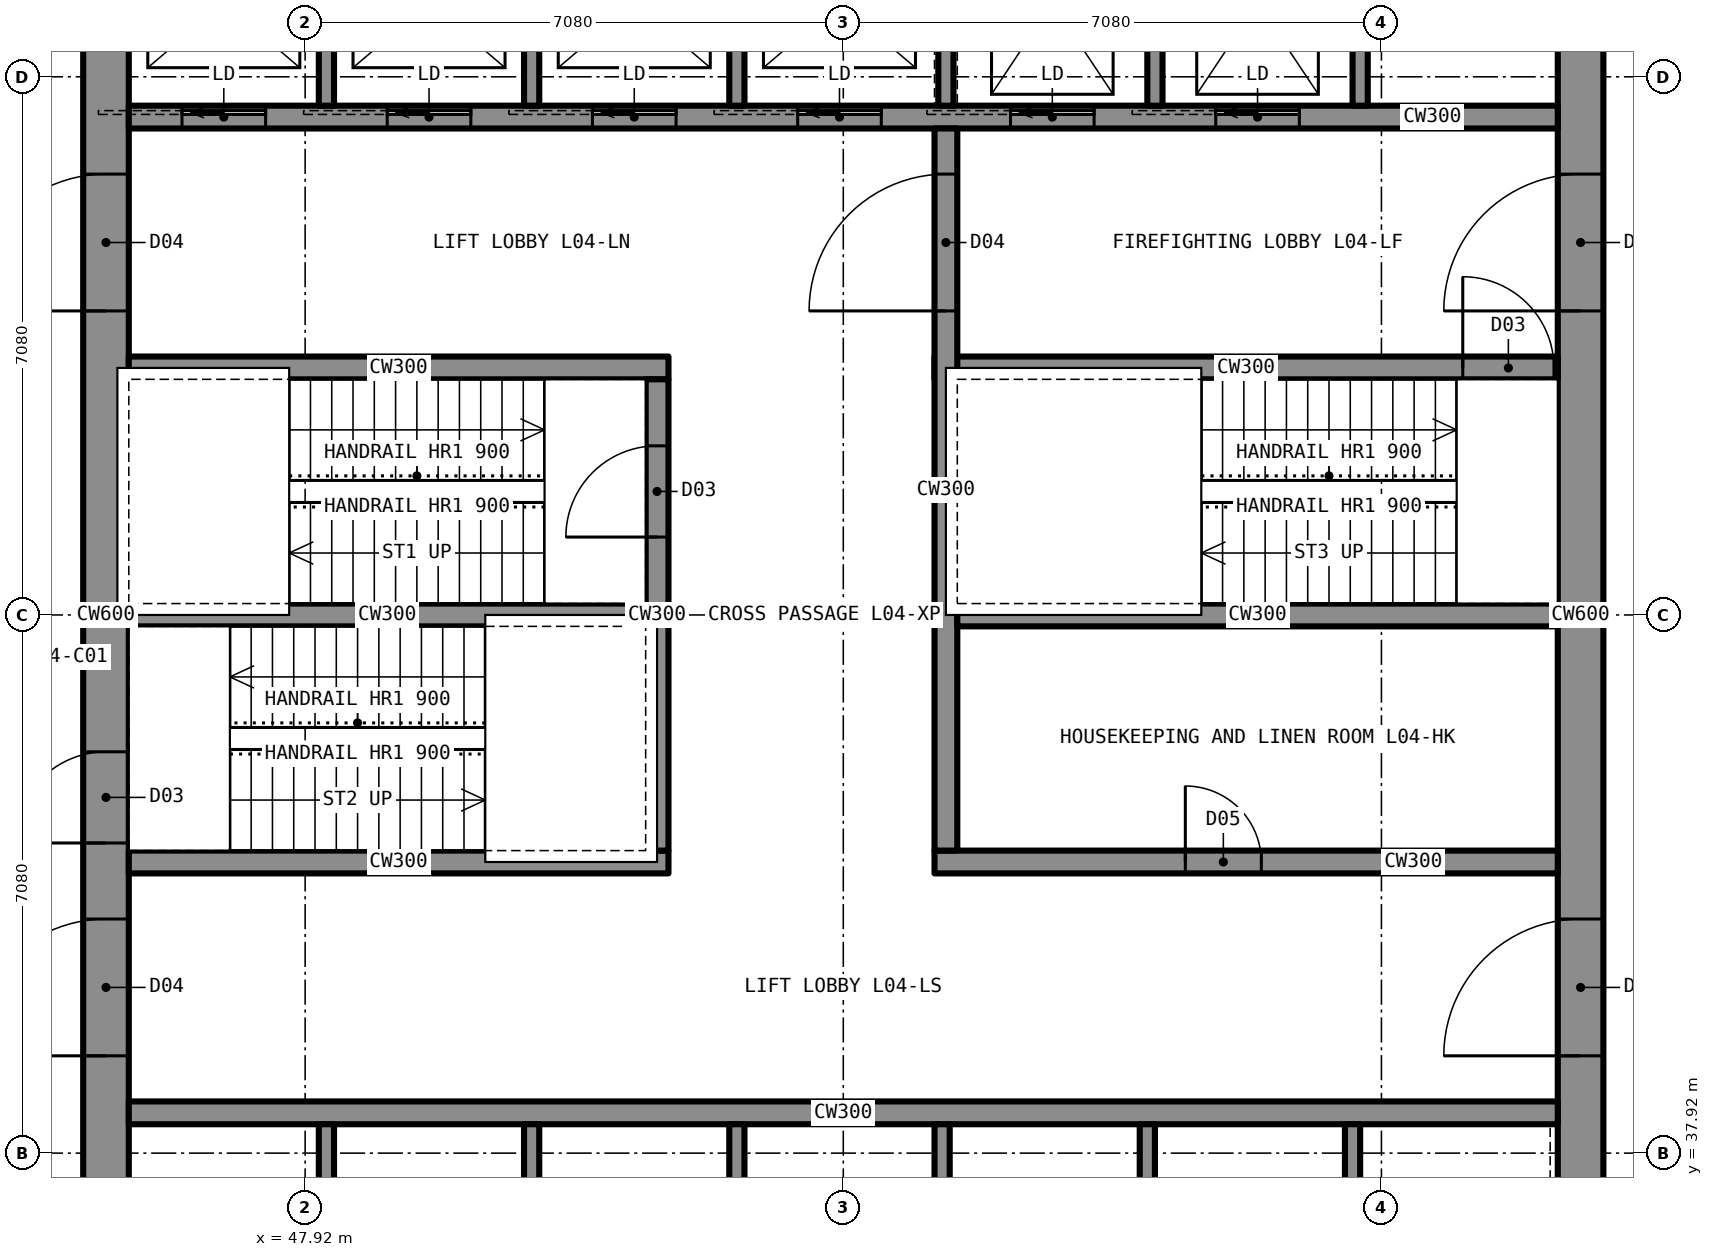
"""IFC4 building model, lengths in metres.
Left out: names, types, materials, properties, quantities, classifications, styles, units other than length and angle.
Written with IfcOpenShell. Run it as: python <this file> out.ifc"""

import sys

from ifc_helpers import new_model, si_unit, direction, frame, frame_2d, origin, place, context, subcontext, project, spatial, rectangle, extrude, element, fill, save


model = new_model("IFC4")
c1 = context("Model", 3, precision=1e-05, world=origin(), true_north=direction((0.0, 1.0)))
c2 = subcontext(c1, "Body", "Model", "MODEL_VIEW")
j1 = project(units=[si_unit("LENGTHUNIT", "METRE"), si_unit("PLANEANGLEUNIT", "RADIAN")], contexts=[c1])
p1 = place(None, origin())
s1 = spatial("IfcSite", under=j1, at=p1, CompositionType="ELEMENT")
p2 = place(p1, origin())
s2 = spatial("IfcBuilding", under=s1, at=p2, CompositionType="ELEMENT")
p3 = place(p2, frame((0.0, 0.0, 20.5)))
s3 = spatial("IfcBuildingStorey", under=s2, at=p3, CompositionType="ELEMENT", Elevation=20.5)
p4 = place(p3, frame((64.7, 35.6, 0.0), z_axis=(0.0, 0.0, 1.0), x_axis=(0.0, 1.0, 0.0)))
e1 = element("IfcWall", 1, at=p4, inside=s3, PredefinedType="SHEAR", context=c2, shape_type="SweptSolid", body=[
    extrude(rectangle(XDim=18.8, YDim=0.6, at=frame_2d((9.4, 0.0))), origin(), (0.0, 0.0, 1.0), 4.5),
])
p5 = place(p4, frame((13.4, 0.0, 0.0)))
e2 = element("IfcOpeningElement", 2, at=p5, cuts=e1, PredefinedType="OPENING", context=c2, shape_type="SweptSolid", body=[
    extrude(rectangle(XDim=1.8, YDim=2.2, at=frame_2d((0.9, 1.1))), frame((0.0, 0.31, 0.0), z_axis=(0.0, -1.0, 0.0), x_axis=(1.0, 0.0, 0.0)), (0.0, 0.0, 1.0), 0.62),
])
p6 = place(p4, frame((3.6, 0.0, 0.0)))
e3 = element("IfcOpeningElement", 3, at=p6, cuts=e1, PredefinedType="OPENING", context=c2, shape_type="SweptSolid", body=[
    extrude(rectangle(XDim=1.8, YDim=2.2, at=frame_2d((0.9, 1.1))), frame((0.0, 0.31, 0.0), z_axis=(0.0, -1.0, 0.0), x_axis=(1.0, 0.0, 0.0)), (0.0, 0.0, 1.0), 0.62),
])
p7 = place(p3, frame((45.3, 35.6, 0.0), z_axis=(0.0, 0.0, 1.0), x_axis=(0.0, 1.0, 0.0)))
e4 = element("IfcWall", 4, at=p7, inside=s3, PredefinedType="SHEAR", context=c2, shape_type="SweptSolid", body=[
    extrude(rectangle(XDim=18.8, YDim=0.6, at=frame_2d((9.4, 0.0))), origin(), (0.0, 0.0, 1.0), 4.5),
])
p8 = place(p7, frame((13.4, 0.0, 0.0)))
e5 = element("IfcOpeningElement", 5, at=p8, cuts=e4, PredefinedType="OPENING", context=c2, shape_type="SweptSolid", body=[
    extrude(rectangle(XDim=1.8, YDim=2.2, at=frame_2d((0.9, 1.1))), frame((0.0, 0.31, 0.0), z_axis=(0.0, -1.0, 0.0), x_axis=(1.0, 0.0, 0.0)), (0.0, 0.0, 1.0), 0.62),
])
p9 = place(p7, frame((3.6, 0.0, 0.0)))
e6 = element("IfcOpeningElement", 6, at=p9, cuts=e4, PredefinedType="OPENING", context=c2, shape_type="SweptSolid", body=[
    extrude(rectangle(XDim=1.8, YDim=2.2, at=frame_2d((0.9, 1.1))), frame((0.0, 0.31, 0.0), z_axis=(0.0, -1.0, 0.0), x_axis=(1.0, 0.0, 0.0)), (0.0, 0.0, 1.0), 0.62),
])
p10 = place(p7, frame((6.4, 0.0, 0.0)))
e7 = element("IfcOpeningElement", 7, at=p10, cuts=e4, PredefinedType="OPENING", context=c2, shape_type="SweptSolid", body=[
    extrude(rectangle(XDim=1.2, YDim=2.2, at=frame_2d((0.6, 1.1))), frame((0.0, 0.31, 0.0), z_axis=(0.0, -1.0, 0.0), x_axis=(1.0, 0.0, 0.0)), (0.0, 0.0, 1.0), 0.62),
])
p11 = place(p3, frame((45.6, 51.55, 0.0), z_axis=(0.0, 0.0, 1.0), x_axis=(1.0, 0.0, 0.0)))
e8 = element("IfcWall", 8, at=p11, inside=s3, PredefinedType="SHEAR", context=c2, shape_type="SweptSolid", body=[
    extrude(rectangle(XDim=18.8, YDim=0.3, at=frame_2d((9.4, 0.0))), origin(), (0.0, 0.0, 1.0), 4.5),
])
p12 = place(p11, frame((0.7, 0.0, 0.0)))
e9 = element("IfcOpeningElement", 9, at=p12, cuts=e8, PredefinedType="OPENING", context=c2, shape_type="SweptSolid", body=[
    extrude(rectangle(XDim=1.1, YDim=2.2, at=frame_2d((0.55, 1.1))), frame((0.0, 0.16, 0.0), z_axis=(0.0, -1.0, 0.0), x_axis=(1.0, 0.0, 0.0)), (0.0, 0.0, 1.0), 0.32),
])
p13 = place(p11, frame((3.4, 0.0, 0.0)))
e10 = element("IfcOpeningElement", 10, at=p13, cuts=e8, PredefinedType="OPENING", context=c2, shape_type="SweptSolid", body=[
    extrude(rectangle(XDim=1.1, YDim=2.2, at=frame_2d((0.55, 1.1))), frame((0.0, 0.16, 0.0), z_axis=(0.0, -1.0, 0.0), x_axis=(1.0, 0.0, 0.0)), (0.0, 0.0, 1.0), 0.32),
])
p14 = place(p11, frame((6.1, 0.0, 0.0)))
e11 = element("IfcOpeningElement", 11, at=p14, cuts=e8, PredefinedType="OPENING", context=c2, shape_type="SweptSolid", body=[
    extrude(rectangle(XDim=1.1, YDim=2.2, at=frame_2d((0.55, 1.1))), frame((0.0, 0.16, 0.0), z_axis=(0.0, -1.0, 0.0), x_axis=(1.0, 0.0, 0.0)), (0.0, 0.0, 1.0), 0.32),
])
p15 = place(p11, frame((8.8, 0.0, 0.0)))
e12 = element("IfcOpeningElement", 12, at=p15, cuts=e8, PredefinedType="OPENING", context=c2, shape_type="SweptSolid", body=[
    extrude(rectangle(XDim=1.1, YDim=2.2, at=frame_2d((0.55, 1.1))), frame((0.0, 0.16, 0.0), z_axis=(0.0, -1.0, 0.0), x_axis=(1.0, 0.0, 0.0)), (0.0, 0.0, 1.0), 0.32),
])
p16 = place(p11, frame((11.6, 0.0, 0.0)))
e13 = element("IfcOpeningElement", 13, at=p16, cuts=e8, PredefinedType="OPENING", context=c2, shape_type="SweptSolid", body=[
    extrude(rectangle(XDim=1.1, YDim=2.2, at=frame_2d((0.55, 1.1))), frame((0.0, 0.16, 0.0), z_axis=(0.0, -1.0, 0.0), x_axis=(1.0, 0.0, 0.0)), (0.0, 0.0, 1.0), 0.32),
])
p17 = place(p11, frame((14.3, 0.0, 0.0)))
e14 = element("IfcOpeningElement", 14, at=p17, cuts=e8, PredefinedType="OPENING", context=c2, shape_type="SweptSolid", body=[
    extrude(rectangle(XDim=1.1, YDim=2.2, at=frame_2d((0.55, 1.1))), frame((0.0, 0.16, 0.0), z_axis=(0.0, -1.0, 0.0), x_axis=(1.0, 0.0, 0.0)), (0.0, 0.0, 1.0), 0.32),
])
p18 = place(p3, frame((45.6, 38.45, 0.0), z_axis=(0.0, 0.0, 1.0), x_axis=(1.0, 0.0, 0.0)))
e15 = element("IfcWall", 15, at=p18, inside=s3, PredefinedType="SHEAR", context=c2, shape_type="SweptSolid", body=[
    extrude(rectangle(XDim=18.8, YDim=0.3, at=frame_2d((9.4, 0.0))), origin(), (0.0, 0.0, 1.0), 4.5),
])
p19 = place(p3, frame((45.6, 48.25, 0.0), z_axis=(0.0, 0.0, 1.0), x_axis=(1.0, 0.0, 0.0)))
e16 = element("IfcWall", 16, at=p19, inside=s3, PredefinedType="SHEAR", context=c2, shape_type="SweptSolid", body=[
    extrude(rectangle(XDim=7.1, YDim=0.3, at=frame_2d((3.55, 0.0))), origin(), (0.0, 0.0, 1.0), 4.5),
])
p20 = place(p3, frame((56.2, 48.25, 0.0), z_axis=(0.0, 0.0, 1.0), x_axis=(1.0, 0.0, 0.0)))
e17 = element("IfcWall", 17, at=p20, inside=s3, PredefinedType="SHEAR", context=c2, shape_type="SweptSolid", body=[
    extrude(rectangle(XDim=8.2, YDim=0.3, at=frame_2d((4.1, 0.0))), origin(), (0.0, 0.0, 1.0), 4.5),
])
p21 = place(p20, frame((6.95, 0.0, 0.0)))
e18 = element("IfcOpeningElement", 18, at=p21, cuts=e17, PredefinedType="OPENING", context=c2, shape_type="SweptSolid", body=[
    extrude(rectangle(XDim=1.2, YDim=2.2, at=frame_2d((0.6, 1.1))), frame((0.0, 0.16, 0.0), z_axis=(0.0, -1.0, 0.0), x_axis=(1.0, 0.0, 0.0)), (0.0, 0.0, 1.0), 0.32),
])
p22 = place(p3, frame((45.6, 41.75, 0.0), z_axis=(0.0, 0.0, 1.0), x_axis=(1.0, 0.0, 0.0)))
e19 = element("IfcWall", 19, at=p22, inside=s3, PredefinedType="SHEAR", context=c2, shape_type="SweptSolid", body=[
    extrude(rectangle(XDim=7.1, YDim=0.3, at=frame_2d((3.55, 0.0))), origin(), (0.0, 0.0, 1.0), 4.5),
])
p23 = place(p3, frame((56.2, 41.75, 0.0), z_axis=(0.0, 0.0, 1.0), x_axis=(1.0, 0.0, 0.0)))
e20 = element("IfcWall", 20, at=p23, inside=s3, PredefinedType="SHEAR", context=c2, shape_type="SweptSolid", body=[
    extrude(rectangle(XDim=8.2, YDim=0.3, at=frame_2d((4.1, 0.0))), origin(), (0.0, 0.0, 1.0), 4.5),
])
p24 = place(p23, frame((3.3, 0.0, 0.0)))
e21 = element("IfcOpeningElement", 21, at=p24, cuts=e20, PredefinedType="OPENING", context=c2, shape_type="SweptSolid", body=[
    extrude(rectangle(XDim=1.0, YDim=2.1, at=frame_2d((0.5, 1.05))), frame((0.0, 0.16, 0.0), z_axis=(0.0, -1.0, 0.0), x_axis=(1.0, 0.0, 0.0)), (0.0, 0.0, 1.0), 0.32),
])
p25 = place(p3, frame((52.55, 41.9, 0.0), z_axis=(0.0, 0.0, 1.0), x_axis=(0.0, 1.0, 0.0)))
e22 = element("IfcWall", 22, at=p25, inside=s3, PredefinedType="SHEAR", context=c2, shape_type="SweptSolid", body=[
    extrude(rectangle(XDim=6.2, YDim=0.3, at=frame_2d((3.1, 0.0))), origin(), (0.0, 0.0, 1.0), 4.5),
])
p26 = place(p25, frame((4.125, 0.0, 0.0)))
e23 = element("IfcOpeningElement", 23, at=p26, cuts=e22, PredefinedType="OPENING", context=c2, shape_type="SweptSolid", body=[
    extrude(rectangle(XDim=1.2, YDim=2.2, at=frame_2d((0.6, 1.1))), frame((0.0, 0.16, 0.0), z_axis=(0.0, -1.0, 0.0), x_axis=(1.0, 0.0, 0.0)), (0.0, 0.0, 1.0), 0.32),
])
p27 = place(p3, frame((56.35, 41.9, 0.0), z_axis=(0.0, 0.0, 1.0), x_axis=(0.0, 1.0, 0.0)))
e24 = element("IfcWall", 24, at=p27, inside=s3, PredefinedType="SHEAR", context=c2, shape_type="SweptSolid", body=[
    extrude(rectangle(XDim=9.5, YDim=0.3, at=frame_2d((4.75, 0.0))), origin(), (0.0, 0.0, 1.0), 4.5),
])
p28 = place(p27, frame((7.1, 0.0, 0.0)))
e25 = element("IfcOpeningElement", 25, at=p28, cuts=e24, PredefinedType="OPENING", context=c2, shape_type="SweptSolid", body=[
    extrude(rectangle(XDim=1.8, YDim=2.2, at=frame_2d((0.9, 1.1))), frame((0.0, 0.16, 0.0), z_axis=(0.0, -1.0, 0.0), x_axis=(1.0, 0.0, 0.0)), (0.0, 0.0, 1.0), 0.32),
])
p29 = place(p3, frame((45.6, 45.0, 0.0), z_axis=(0.0, 0.0, 1.0), x_axis=(1.0, 0.0, 0.0)))
e26 = element("IfcWall", 26, at=p29, inside=s3, PredefinedType="SHEAR", context=c2, shape_type="SweptSolid", body=[
    extrude(rectangle(XDim=6.8, YDim=0.3, at=frame_2d((3.4, 0.0))), origin(), (0.0, 0.0, 1.0), 4.5),
])
p30 = place(p3, frame((56.5, 45.0, 0.0), z_axis=(0.0, 0.0, 1.0), x_axis=(1.0, 0.0, 0.0)))
e27 = element("IfcWall", 27, at=p30, inside=s3, PredefinedType="SHEAR", context=c2, shape_type="SweptSolid", body=[
    extrude(rectangle(XDim=7.9, YDim=0.3, at=frame_2d((3.95, 0.0))), origin(), (0.0, 0.0, 1.0), 4.5),
])
for number, where, z_axis, x_axis in (
    (28, (48.2, 51.7, 0.0), (0.0, 0.0, 1.0), (0.0, 1.0, 0.0)),
    (29, (50.9, 51.7, 0.0), (0.0, 0.0, 1.0), (0.0, 1.0, 0.0)),
    (30, (53.6, 51.7, 0.0), (0.0, 0.0, 1.0), (0.0, 1.0, 0.0)),
    (31, (59.1, 51.7, 0.0), (0.0, 0.0, 1.0), (0.0, 1.0, 0.0)),
    (32, (61.8, 51.7, 0.0), (0.0, 0.0, 1.0), (0.0, 1.0, 0.0)),
    (33, (56.35, 51.7, 0.0), (0.0, 0.0, 1.0), (0.0, 1.0, 0.0)),
    (34, (48.2, 35.6, 0.0), (0.0, 0.0, 1.0), (0.0, 1.0, 0.0)),
    (35, (50.9, 35.6, 0.0), (0.0, 0.0, 1.0), (0.0, 1.0, 0.0)),
    (36, (53.6, 35.6, 0.0), (0.0, 0.0, 1.0), (0.0, 1.0, 0.0)),
    (37, (56.3, 35.6, 0.0), (0.0, 0.0, 1.0), (0.0, 1.0, 0.0)),
    (38, (59.0, 35.6, 0.0), (0.0, 0.0, 1.0), (0.0, 1.0, 0.0)),
    (39, (61.7, 35.6, 0.0), (0.0, 0.0, 1.0), (0.0, 1.0, 0.0)),
):
    element("IfcWall", number, at=place(p3, frame(where, z_axis=z_axis, x_axis=x_axis)), inside=s3, PredefinedType="PARTITIONING", context=c2, shape_type="SweptSolid", body=[
        extrude(rectangle(XDim=2.7, YDim=0.2, at=frame_2d((1.35, 0.0))), origin(), (0.0, 0.0, 1.0), 4.33),
    ])
p31 = place(p8, origin())
e40 = element("IfcDoor", 40, at=p31, inside=s3, OperationType="DOUBLE_DOOR_SINGLE_SWING", PredefinedType="DOOR", context=c2, shape_type="SweptSolid", body=[
    extrude(rectangle(XDim=1.8, YDim=2.2, at=frame_2d((0.9, 1.1))), frame((0.0, 0.025, 0.0), z_axis=(0.0, -1.0, 0.0), x_axis=(1.0, 0.0, 0.0)), (0.0, 0.0, 1.0), 0.05),
])
fill(e5, e40)
p32 = place(p9, origin())
e41 = element("IfcDoor", 41, at=p32, inside=s3, OperationType="DOUBLE_DOOR_SINGLE_SWING", PredefinedType="DOOR", context=c2, shape_type="SweptSolid", body=[
    extrude(rectangle(XDim=1.8, YDim=2.2, at=frame_2d((0.9, 1.1))), frame((0.0, 0.025, 0.0), z_axis=(0.0, -1.0, 0.0), x_axis=(1.0, 0.0, 0.0)), (0.0, 0.0, 1.0), 0.05),
])
fill(e6, e41)
p33 = place(p5, origin())
e42 = element("IfcDoor", 42, at=p33, inside=s3, OperationType="DOUBLE_DOOR_SINGLE_SWING", PredefinedType="DOOR", context=c2, shape_type="SweptSolid", body=[
    extrude(rectangle(XDim=1.8, YDim=2.2, at=frame_2d((0.9, 1.1))), frame((0.0, 0.025, 0.0), z_axis=(0.0, -1.0, 0.0), x_axis=(1.0, 0.0, 0.0)), (0.0, 0.0, 1.0), 0.05),
])
fill(e2, e42)
p34 = place(p6, origin())
e43 = element("IfcDoor", 43, at=p34, inside=s3, OperationType="DOUBLE_DOOR_SINGLE_SWING", PredefinedType="DOOR", context=c2, shape_type="SweptSolid", body=[
    extrude(rectangle(XDim=1.8, YDim=2.2, at=frame_2d((0.9, 1.1))), frame((0.0, 0.025, 0.0), z_axis=(0.0, -1.0, 0.0), x_axis=(1.0, 0.0, 0.0)), (0.0, 0.0, 1.0), 0.05),
])
fill(e3, e43)
p35 = place(p28, origin())
e44 = element("IfcDoor", 44, at=p35, inside=s3, OperationType="DOUBLE_DOOR_SINGLE_SWING", PredefinedType="DOOR", context=c2, shape_type="SweptSolid", body=[
    extrude(rectangle(XDim=1.8, YDim=2.2, at=frame_2d((0.9, 1.1))), frame((0.0, 0.025, 0.0), z_axis=(0.0, -1.0, 0.0), x_axis=(1.0, 0.0, 0.0)), (0.0, 0.0, 1.0), 0.05),
])
fill(e25, e44)
p36 = place(p26, origin())
e45 = element("IfcDoor", 45, at=p36, inside=s3, OperationType="SINGLE_SWING_LEFT", PredefinedType="DOOR", context=c2, shape_type="SweptSolid", body=[
    extrude(rectangle(XDim=1.2, YDim=2.2, at=frame_2d((0.6, 1.1))), frame((0.0, 0.025, 0.0), z_axis=(0.0, -1.0, 0.0), x_axis=(1.0, 0.0, 0.0)), (0.0, 0.0, 1.0), 0.05),
])
fill(e23, e45)
p37 = place(p10, origin())
e46 = element("IfcDoor", 46, at=p37, inside=s3, OperationType="SINGLE_SWING_LEFT", PredefinedType="DOOR", context=c2, shape_type="SweptSolid", body=[
    extrude(rectangle(XDim=1.2, YDim=2.2, at=frame_2d((0.6, 1.1))), frame((0.0, 0.025, 0.0), z_axis=(0.0, -1.0, 0.0), x_axis=(1.0, 0.0, 0.0)), (0.0, 0.0, 1.0), 0.05),
])
fill(e7, e46)
p38 = place(p21, origin())
e47 = element("IfcDoor", 47, at=p38, inside=s3, OperationType="SINGLE_SWING_LEFT", PredefinedType="DOOR", context=c2, shape_type="SweptSolid", body=[
    extrude(rectangle(XDim=1.2, YDim=2.2, at=frame_2d((0.6, 1.1))), frame((0.0, 0.025, 0.0), z_axis=(0.0, -1.0, 0.0), x_axis=(1.0, 0.0, 0.0)), (0.0, 0.0, 1.0), 0.05),
])
fill(e18, e47)
p39 = place(p24, origin())
e48 = element("IfcDoor", 48, at=p39, inside=s3, OperationType="SINGLE_SWING_LEFT", PredefinedType="DOOR", context=c2, shape_type="SweptSolid", body=[
    extrude(rectangle(XDim=1.0, YDim=2.1, at=frame_2d((0.5, 1.05))), frame((0.0, 0.025, 0.0), z_axis=(0.0, -1.0, 0.0), x_axis=(1.0, 0.0, 0.0)), (0.0, 0.0, 1.0), 0.05),
])
fill(e21, e48)
p40 = place(p12, origin())
e49 = element("IfcDoor", 49, at=p40, inside=s3, OperationType="SLIDING_TO_LEFT", PredefinedType="DOOR", context=c2, shape_type="SweptSolid", body=[
    extrude(rectangle(XDim=1.1, YDim=2.2, at=frame_2d((0.55, 1.1))), frame((0.0, 0.025, 0.0), z_axis=(0.0, -1.0, 0.0), x_axis=(1.0, 0.0, 0.0)), (0.0, 0.0, 1.0), 0.05),
])
fill(e9, e49)
p41 = place(p13, origin())
e50 = element("IfcDoor", 50, at=p41, inside=s3, OperationType="SLIDING_TO_LEFT", PredefinedType="DOOR", context=c2, shape_type="SweptSolid", body=[
    extrude(rectangle(XDim=1.1, YDim=2.2, at=frame_2d((0.55, 1.1))), frame((0.0, 0.025, 0.0), z_axis=(0.0, -1.0, 0.0), x_axis=(1.0, 0.0, 0.0)), (0.0, 0.0, 1.0), 0.05),
])
fill(e10, e50)
p42 = place(p14, origin())
e51 = element("IfcDoor", 51, at=p42, inside=s3, OperationType="SLIDING_TO_LEFT", PredefinedType="DOOR", context=c2, shape_type="SweptSolid", body=[
    extrude(rectangle(XDim=1.1, YDim=2.2, at=frame_2d((0.55, 1.1))), frame((0.0, 0.025, 0.0), z_axis=(0.0, -1.0, 0.0), x_axis=(1.0, 0.0, 0.0)), (0.0, 0.0, 1.0), 0.05),
])
fill(e11, e51)
p43 = place(p15, origin())
e52 = element("IfcDoor", 52, at=p43, inside=s3, OperationType="SLIDING_TO_LEFT", PredefinedType="DOOR", context=c2, shape_type="SweptSolid", body=[
    extrude(rectangle(XDim=1.1, YDim=2.2, at=frame_2d((0.55, 1.1))), frame((0.0, 0.025, 0.0), z_axis=(0.0, -1.0, 0.0), x_axis=(1.0, 0.0, 0.0)), (0.0, 0.0, 1.0), 0.05),
])
fill(e12, e52)
p44 = place(p16, origin())
e53 = element("IfcDoor", 53, at=p44, inside=s3, OperationType="SLIDING_TO_LEFT", PredefinedType="DOOR", context=c2, shape_type="SweptSolid", body=[
    extrude(rectangle(XDim=1.1, YDim=2.2, at=frame_2d((0.55, 1.1))), frame((0.0, 0.025, 0.0), z_axis=(0.0, -1.0, 0.0), x_axis=(1.0, 0.0, 0.0)), (0.0, 0.0, 1.0), 0.05),
])
fill(e13, e53)
p45 = place(p17, origin())
e54 = element("IfcDoor", 54, at=p45, inside=s3, OperationType="SLIDING_TO_LEFT", PredefinedType="DOOR", context=c2, shape_type="SweptSolid", body=[
    extrude(rectangle(XDim=1.1, YDim=2.2, at=frame_2d((0.55, 1.1))), frame((0.0, 0.025, 0.0), z_axis=(0.0, -1.0, 0.0), x_axis=(1.0, 0.0, 0.0)), (0.0, 0.0, 1.0), 0.05),
])
fill(e14, e54)
save(model, sys.argv[1])
